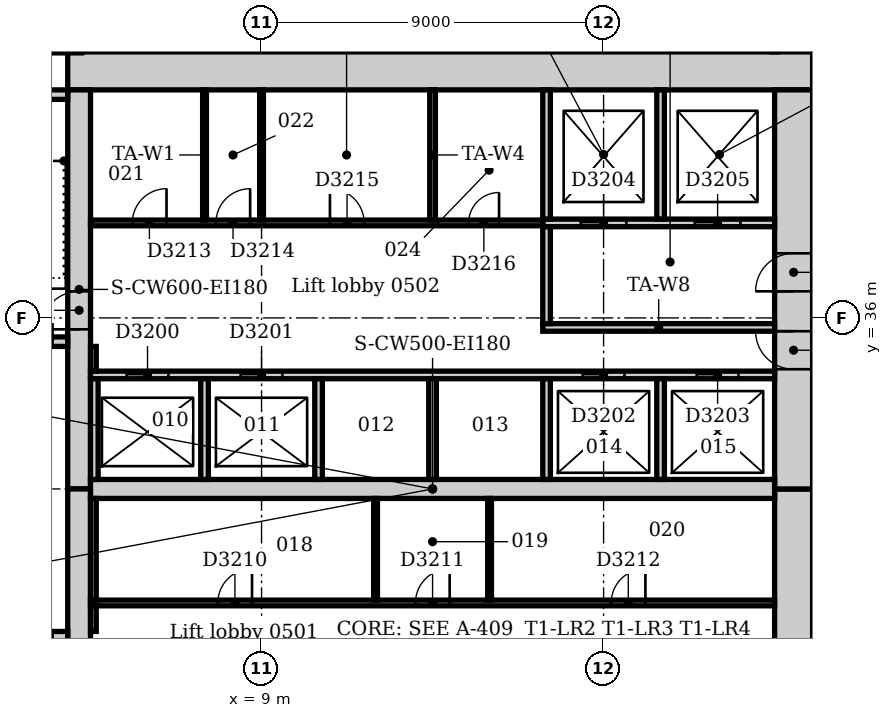
"""IFC4 building model, lengths in metres.
Left out: names, types, materials, properties, quantities, classifications, styles, units other than length and angle.
Written with IfcOpenShell. Run it as: python <this file> out.ifc"""

import sys

from ifc_helpers import new_model, si_unit, direction, frame, frame_2d, origin, origin_2d, place, context, subcontext, project, spatial, rectangle, extrude, element, fill, save


model = new_model("IFC4")
c1 = context("Model", 3, precision=1e-05, world=origin(), true_north=direction((0.0, 1.0)))
c2 = subcontext(c1, "Body", "Model", "MODEL_VIEW")
j1 = project(units=[si_unit("LENGTHUNIT", "METRE"), si_unit("PLANEANGLEUNIT", "RADIAN")], contexts=[c1])
p1 = place(None, origin())
s1 = spatial("IfcSite", under=j1, at=p1, CompositionType="ELEMENT")
p2 = place(p1, origin())
s2 = spatial("IfcBuilding", under=s1, at=p2, CompositionType="ELEMENT")
p3 = place(p2, frame((0.0, 0.0, 26.0)))
s3 = spatial("IfcBuildingStorey", under=s2, at=p3, CompositionType="ELEMENT", Elevation=26.0)
p4 = place(p3, frame((23.5, 42.5, 0.0), z_axis=(0.0, 0.0, 1.0), x_axis=(-1.0, 0.0, 0.0)))
e1 = element("IfcWall", 1, at=p4, inside=s3, PredefinedType="SOLIDWALL", context=c2, shape_type="SweptSolid", body=[
    extrude(rectangle(XDim=19.6, YDim=1.0, at=frame_2d((9.8, 0.0))), origin(), (0.0, 0.0, 1.0), 4.0),
])
p5 = place(p3, frame((23.0, 21.0, 0.0), z_axis=(0.0, 0.0, 1.0), x_axis=(0.0, 1.0, 0.0)))
e2 = element("IfcWall", 2, at=p5, inside=s3, PredefinedType="SOLIDWALL", context=c2, shape_type="SweptSolid", body=[
    extrude(rectangle(XDim=10.5, YDim=1.0, at=frame_2d((5.25, 0.0))), origin(), (0.0, 0.0, 1.0), 4.0),
])
p6 = place(p5, frame((4.35, 0.0, 0.0)))
e3 = element("IfcOpeningElement", 3, at=p6, cuts=e2, PredefinedType="OPENING", context=c2, shape_type="SweptSolid", body=[
    extrude(rectangle(XDim=1.8, YDim=2.1, at=frame_2d((0.9, 1.05))), frame((0.0, 0.51, 0.0), z_axis=(0.0, -1.0, 0.0), x_axis=(1.0, 0.0, 0.0)), (0.0, 0.0, 1.0), 1.02),
])
p7 = place(p3, frame((23.0, 31.5, 0.0), z_axis=(0.0, 0.0, 1.0), x_axis=(0.0, 1.0, 0.0)))
e4 = element("IfcWall", 4, at=p7, inside=s3, PredefinedType="SOLIDWALL", context=c2, shape_type="SweptSolid", body=[
    extrude(rectangle(XDim=10.5, YDim=1.0, at=frame_2d((5.25, 0.0))), origin(), (0.0, 0.0, 1.0), 4.0),
])
p8 = place(p7, frame((3.15, 0.0, 0.0)))
e5 = element("IfcOpeningElement", 5, at=p8, cuts=e4, PredefinedType="OPENING", context=c2, shape_type="SweptSolid", body=[
    extrude(rectangle(XDim=1.0, YDim=2.1, at=frame_2d((0.5, 1.05))), frame((0.0, 0.51, 0.0), z_axis=(0.0, -1.0, 0.0), x_axis=(1.0, 0.0, 0.0)), (0.0, 0.0, 1.0), 1.02),
])
p9 = place(p7, frame((5.2, 0.0, 0.0)))
e6 = element("IfcOpeningElement", 6, at=p9, cuts=e4, PredefinedType="OPENING", context=c2, shape_type="SweptSolid", body=[
    extrude(rectangle(XDim=1.0, YDim=2.1, at=frame_2d((0.5, 1.05))), frame((0.0, 0.51, 0.0), z_axis=(0.0, -1.0, 0.0), x_axis=(1.0, 0.0, 0.0)), (0.0, 0.0, 1.0), 1.02),
])
p10 = place(p3, frame((4.2, 42.0, 0.0), z_axis=(0.0, 0.0, 1.0), x_axis=(0.0, -1.0, 0.0)))
e7 = element("IfcWall", 7, at=p10, inside=s3, PredefinedType="SOLIDWALL", context=c2, shape_type="SweptSolid", body=[
    extrude(rectangle(XDim=10.5, YDim=0.6, at=frame_2d((5.25, 0.0))), origin(), (0.0, 0.0, 1.0), 4.0),
])
p11 = place(p10, frame((5.3, 0.0, 0.0)))
e8 = element("IfcOpeningElement", 8, at=p11, cuts=e7, PredefinedType="OPENING", context=c2, shape_type="SweptSolid", body=[
    extrude(rectangle(XDim=1.0, YDim=2.1, at=frame_2d((0.5, 1.05))), frame((0.0, 0.31, 0.0), z_axis=(0.0, -1.0, 0.0), x_axis=(1.0, 0.0, 0.0)), (0.0, 0.0, 1.0), 0.62),
])
p12 = place(p3, frame((4.2, 31.5, 0.0), z_axis=(0.0, 0.0, 1.0), x_axis=(0.0, -1.0, 0.0)))
e9 = element("IfcWall", 9, at=p12, inside=s3, PredefinedType="SOLIDWALL", context=c2, shape_type="SweptSolid", body=[
    extrude(rectangle(XDim=10.5, YDim=0.6, at=frame_2d((5.25, 0.0))), origin(), (0.0, 0.0, 1.0), 4.0),
])
p13 = place(p12, frame((4.25, 0.0, 0.0)))
e10 = element("IfcOpeningElement", 10, at=p13, cuts=e9, PredefinedType="OPENING", context=c2, shape_type="SweptSolid", body=[
    extrude(rectangle(XDim=1.0, YDim=2.1, at=frame_2d((0.5, 1.05))), frame((0.0, 0.31, 0.0), z_axis=(0.0, -1.0, 0.0), x_axis=(1.0, 0.0, 0.0)), (0.0, 0.0, 1.0), 0.62),
])
p14 = place(p3, frame((4.5, 31.5, 0.0), z_axis=(0.0, 0.0, 1.0), x_axis=(1.0, 0.0, 0.0)))
e11 = element("IfcWall", 11, at=p14, inside=s3, PredefinedType="SOLIDWALL", context=c2, shape_type="SweptSolid", body=[
    extrude(rectangle(XDim=18.0, YDim=0.5, at=frame_2d((9.0, 0.0))), origin(), (0.0, 0.0, 1.0), 4.0),
])
p15 = place(p3, frame((3.9, 27.625, 0.0), z_axis=(0.0, 0.0, 1.0), x_axis=(-1.0, 0.0, 0.0)))
e12 = element("IfcWall", 12, at=p15, inside=s3, PredefinedType="SOLIDWALL", context=c2, shape_type="SweptSolid", body=[
    extrude(rectangle(XDim=3.54, YDim=0.25, at=frame_2d((1.77, 0.0))), origin(), (0.0, 0.0, 1.0), 4.0),
])
p16 = place(p15, frame((0.4, 0.0, 0.0)))
e13 = element("IfcOpeningElement", 13, at=p16, cuts=e12, PredefinedType="OPENING", context=c2, shape_type="SweptSolid", body=[
    extrude(rectangle(XDim=1.0, YDim=2.1, at=frame_2d((0.5, 1.05))), frame((0.0, 0.135, 0.0), z_axis=(0.0, -1.0, 0.0), x_axis=(1.0, 0.0, 0.0)), (0.0, 0.0, 1.0), 0.27),
])
p17 = place(p3, frame((0.36, 35.375, 0.0), z_axis=(0.0, 0.0, 1.0), x_axis=(1.0, 0.0, 0.0)))
e14 = element("IfcWall", 14, at=p17, inside=s3, PredefinedType="SOLIDWALL", context=c2, shape_type="SweptSolid", body=[
    extrude(rectangle(XDim=3.54, YDim=0.25, at=frame_2d((1.77, 0.0))), origin(), (0.0, 0.0, 1.0), 4.0),
])
p18 = place(p17, frame((2.14, 0.0, 0.0)))
e15 = element("IfcOpeningElement", 15, at=p18, cuts=e14, PredefinedType="OPENING", context=c2, shape_type="SweptSolid", body=[
    extrude(rectangle(XDim=1.0, YDim=2.1, at=frame_2d((0.5, 1.05))), frame((0.0, 0.135, 0.0), z_axis=(0.0, -1.0, 0.0), x_axis=(1.0, 0.0, 0.0)), (0.0, 0.0, 1.0), 0.27),
])
p19 = place(p3, frame((3.9, 41.875, 0.0), z_axis=(0.0, 0.0, 1.0), x_axis=(-1.0, 0.0, 0.0)))
e16 = element("IfcWall", 16, at=p19, inside=s3, PredefinedType="SOLIDWALL", context=c2, shape_type="SweptSolid", body=[
    extrude(rectangle(XDim=3.54, YDim=0.25, at=frame_2d((1.77, 0.0))), origin(), (0.0, 0.0, 1.0), 4.0),
])
p20 = place(p3, frame((3.667, 43.574, 0.0), z_axis=(0.0, 0.0, 1.0), x_axis=(1.0, 0.0, 0.0)))
e17 = element("IfcColumn", 17, at=p20, inside=s3, PredefinedType="COLUMN", context=c2, shape_type="SweptSolid", body=[
    extrude(rectangle(XDim=1.2, YDim=1.2, at=origin_2d()), origin(), (0.0, 0.0, 1.0), 3.85),
])
p21 = place(p3, frame((16.4, 35.75, 0.0), z_axis=(0.0, 0.0, 1.0), x_axis=(1.0, 0.0, 0.0)))
e18 = element("IfcWall", 18, at=p21, inside=s3, PredefinedType="PARTITIONING", context=c2, shape_type="SweptSolid", body=[
    extrude(rectangle(XDim=6.1, YDim=0.2, at=frame_2d((3.05, 0.0))), origin(), (0.0, 0.0, 1.0), 3.85),
])
p22 = place(p3, frame((16.4, 38.5, 0.0), z_axis=(0.0, 0.0, 1.0), x_axis=(1.0, 0.0, 0.0)))
e19 = element("IfcWall", 19, at=p22, inside=s3, PredefinedType="PARTITIONING", context=c2, shape_type="SweptSolid", body=[
    extrude(rectangle(XDim=6.1, YDim=0.2, at=frame_2d((3.05, 0.0))), origin(), (0.0, 0.0, 1.0), 3.85),
])
p23 = place(p22, frame((1.0, 0.0, 0.0)))
e20 = element("IfcOpeningElement", 20, at=p23, cuts=e19, PredefinedType="OPENING", context=c2, shape_type="SweptSolid", body=[
    extrude(rectangle(XDim=1.2, YDim=2.1, at=frame_2d((0.6, 1.05))), frame((0.0, 0.11, 0.0), z_axis=(0.0, -1.0, 0.0), x_axis=(1.0, 0.0, 0.0)), (0.0, 0.0, 1.0), 0.22),
])
p24 = place(p22, frame((4.0, 0.0, 0.0)))
e21 = element("IfcOpeningElement", 21, at=p24, cuts=e19, PredefinedType="OPENING", context=c2, shape_type="SweptSolid", body=[
    extrude(rectangle(XDim=1.2, YDim=2.1, at=frame_2d((0.6, 1.05))), frame((0.0, 0.11, 0.0), z_axis=(0.0, -1.0, 0.0), x_axis=(1.0, 0.0, 0.0)), (0.0, 0.0, 1.0), 0.22),
])
p25 = place(p3, frame((16.5, 35.85, 0.0), z_axis=(0.0, 0.0, 1.0), x_axis=(0.0, 1.0, 0.0)))
e22 = element("IfcWall", 22, at=p25, inside=s3, PredefinedType="PARTITIONING", context=c2, shape_type="SweptSolid", body=[
    extrude(rectangle(XDim=2.55, YDim=0.2, at=frame_2d((1.275, 0.0))), origin(), (0.0, 0.0, 1.0), 3.85),
])
p26 = place(p3, frame((4.5, 34.5, 0.0), z_axis=(0.0, 0.0, 1.0), x_axis=(1.0, 0.0, 0.0)))
e23 = element("IfcWall", 23, at=p26, inside=s3, PredefinedType="PARTITIONING", context=c2, shape_type="SweptSolid", body=[
    extrude(rectangle(XDim=18.0, YDim=0.2, at=frame_2d((9.0, 0.0))), origin(), (0.0, 0.0, 1.0), 3.85),
])
p27 = place(p26, frame((0.95, 0.0, 0.0)))
e24 = element("IfcOpeningElement", 24, at=p27, cuts=e23, PredefinedType="OPENING", context=c2, shape_type="SweptSolid", body=[
    extrude(rectangle(XDim=1.1, YDim=2.1, at=frame_2d((0.55, 1.05))), frame((0.0, 0.11, 0.0), z_axis=(0.0, -1.0, 0.0), x_axis=(1.0, 0.0, 0.0)), (0.0, 0.0, 1.0), 0.22),
])
p28 = place(p26, frame((3.95, 0.0, 0.0)))
e25 = element("IfcOpeningElement", 25, at=p28, cuts=e23, PredefinedType="OPENING", context=c2, shape_type="SweptSolid", body=[
    extrude(rectangle(XDim=1.1, YDim=2.1, at=frame_2d((0.55, 1.05))), frame((0.0, 0.11, 0.0), z_axis=(0.0, -1.0, 0.0), x_axis=(1.0, 0.0, 0.0)), (0.0, 0.0, 1.0), 0.22),
])
p29 = place(p26, frame((12.95, 0.0, 0.0)))
e26 = element("IfcOpeningElement", 26, at=p29, cuts=e23, PredefinedType="OPENING", context=c2, shape_type="SweptSolid", body=[
    extrude(rectangle(XDim=1.1, YDim=2.1, at=frame_2d((0.55, 1.05))), frame((0.0, 0.11, 0.0), z_axis=(0.0, -1.0, 0.0), x_axis=(1.0, 0.0, 0.0)), (0.0, 0.0, 1.0), 0.22),
])
p30 = place(p26, frame((15.95, 0.0, 0.0)))
e27 = element("IfcOpeningElement", 27, at=p30, cuts=e23, PredefinedType="OPENING", context=c2, shape_type="SweptSolid", body=[
    extrude(rectangle(XDim=1.1, YDim=2.1, at=frame_2d((0.55, 1.05))), frame((0.0, 0.11, 0.0), z_axis=(0.0, -1.0, 0.0), x_axis=(1.0, 0.0, 0.0)), (0.0, 0.0, 1.0), 0.22),
])
for number, where, z_axis, x_axis in (
    (28, (16.5, 38.6, 0.0), (0.0, 0.0, 1.0), (0.0, 1.0, 0.0)),
    (29, (19.5, 38.6, 0.0), (0.0, 0.0, 1.0), (0.0, 1.0, 0.0)),
):
    element("IfcWall", number, at=place(p3, frame(where, z_axis=z_axis, x_axis=x_axis)), inside=s3, PredefinedType="PARTITIONING", context=c2, shape_type="SweptSolid", body=[
        extrude(rectangle(XDim=3.4, YDim=0.2, at=frame_2d((1.7, 0.0))), origin(), (0.0, 0.0, 1.0), 3.85),
    ])
for number, where, z_axis, x_axis in (
    (30, (4.6, 31.75, 0.0), (0.0, 0.0, 1.0), (0.0, 1.0, 0.0)),
    (31, (7.5, 31.75, 0.0), (0.0, 0.0, 1.0), (0.0, 1.0, 0.0)),
    (32, (10.5, 31.75, 0.0), (0.0, 0.0, 1.0), (0.0, 1.0, 0.0)),
    (33, (13.5, 31.75, 0.0), (0.0, 0.0, 1.0), (0.0, 1.0, 0.0)),
    (34, (16.5, 31.75, 0.0), (0.0, 0.0, 1.0), (0.0, 1.0, 0.0)),
    (35, (19.5, 31.75, 0.0), (0.0, 0.0, 1.0), (0.0, 1.0, 0.0)),
):
    element("IfcWall", number, at=place(p3, frame(where, z_axis=z_axis, x_axis=x_axis)), inside=s3, PredefinedType="PARTITIONING", context=c2, shape_type="SweptSolid", body=[
        extrude(rectangle(XDim=2.65, YDim=0.2, at=frame_2d((1.325, 0.0))), origin(), (0.0, 0.0, 1.0), 3.85),
    ])
p31 = place(p3, frame((4.5, 28.5, 0.0), z_axis=(0.0, 0.0, 1.0), x_axis=(1.0, 0.0, 0.0)))
e36 = element("IfcWall", 36, at=p31, inside=s3, PredefinedType="PARTITIONING", context=c2, shape_type="SweptSolid", body=[
    extrude(rectangle(XDim=18.0, YDim=0.15, at=frame_2d((9.0, 0.0))), origin(), (0.0, 0.0, 1.0), 3.85),
])
p32 = place(p31, frame((3.35, 0.0, 0.0)))
e37 = element("IfcOpeningElement", 37, at=p32, cuts=e36, PredefinedType="OPENING", context=c2, shape_type="SweptSolid", body=[
    extrude(rectangle(XDim=0.9, YDim=2.1, at=frame_2d((0.45, 1.05))), frame((0.0, 0.085, 0.0), z_axis=(0.0, -1.0, 0.0), x_axis=(1.0, 0.0, 0.0)), (0.0, 0.0, 1.0), 0.17),
])
p33 = place(p31, frame((8.55, 0.0, 0.0)))
e38 = element("IfcOpeningElement", 38, at=p33, cuts=e36, PredefinedType="OPENING", context=c2, shape_type="SweptSolid", body=[
    extrude(rectangle(XDim=0.9, YDim=2.1, at=frame_2d((0.45, 1.05))), frame((0.0, 0.085, 0.0), z_axis=(0.0, -1.0, 0.0), x_axis=(1.0, 0.0, 0.0)), (0.0, 0.0, 1.0), 0.17),
])
p34 = place(p31, frame((13.7, 0.0, 0.0)))
e39 = element("IfcOpeningElement", 39, at=p34, cuts=e36, PredefinedType="OPENING", context=c2, shape_type="SweptSolid", body=[
    extrude(rectangle(XDim=0.9, YDim=2.1, at=frame_2d((0.45, 1.05))), frame((0.0, 0.085, 0.0), z_axis=(0.0, -1.0, 0.0), x_axis=(1.0, 0.0, 0.0)), (0.0, 0.0, 1.0), 0.17),
])
p35 = place(p3, frame((4.5, 38.5, 0.0), z_axis=(0.0, 0.0, 1.0), x_axis=(1.0, 0.0, 0.0)))
e40 = element("IfcWall", 40, at=p35, inside=s3, PredefinedType="PARTITIONING", context=c2, shape_type="SweptSolid", body=[
    extrude(rectangle(XDim=11.9, YDim=0.15, at=frame_2d((5.95, 0.0))), origin(), (0.0, 0.0, 1.0), 3.85),
])
p36 = place(p35, frame((1.1, 0.0, 0.0)))
e41 = element("IfcOpeningElement", 41, at=p36, cuts=e40, PredefinedType="OPENING", context=c2, shape_type="SweptSolid", body=[
    extrude(rectangle(XDim=0.9, YDim=2.1, at=frame_2d((0.45, 1.05))), frame((0.0, 0.085, 0.0), z_axis=(0.0, -1.0, 0.0), x_axis=(1.0, 0.0, 0.0)), (0.0, 0.0, 1.0), 0.17),
])
p37 = place(p35, frame((3.3, 0.0, 0.0)))
e42 = element("IfcOpeningElement", 42, at=p37, cuts=e40, PredefinedType="OPENING", context=c2, shape_type="SweptSolid", body=[
    extrude(rectangle(XDim=0.9, YDim=2.1, at=frame_2d((0.45, 1.05))), frame((0.0, 0.085, 0.0), z_axis=(0.0, -1.0, 0.0), x_axis=(1.0, 0.0, 0.0)), (0.0, 0.0, 1.0), 0.17),
])
p38 = place(p35, frame((6.3, 0.0, 0.0)))
e43 = element("IfcOpeningElement", 43, at=p38, cuts=e40, PredefinedType="OPENING", context=c2, shape_type="SweptSolid", body=[
    extrude(rectangle(XDim=0.9, YDim=2.1, at=frame_2d((0.45, 1.05))), frame((0.0, 0.085, 0.0), z_axis=(0.0, -1.0, 0.0), x_axis=(1.0, 0.0, 0.0)), (0.0, 0.0, 1.0), 0.17),
])
p39 = place(p35, frame((9.95, 0.0, 0.0)))
e44 = element("IfcOpeningElement", 44, at=p39, cuts=e40, PredefinedType="OPENING", context=c2, shape_type="SweptSolid", body=[
    extrude(rectangle(XDim=0.8, YDim=2.1, at=frame_2d((0.4, 1.05))), frame((0.0, 0.085, 0.0), z_axis=(0.0, -1.0, 0.0), x_axis=(1.0, 0.0, 0.0)), (0.0, 0.0, 1.0), 0.17),
])
p40 = place(p3, frame((4.575, 27.75, 0.0), z_axis=(0.0, 0.0, 1.0), x_axis=(0.0, 1.0, 0.0)))
e45 = element("IfcWall", 45, at=p40, inside=s3, PredefinedType="PARTITIONING", context=c2, shape_type="SweptSolid", body=[
    extrude(rectangle(XDim=0.675, YDim=0.15, at=frame_2d((0.338, 0.0))), origin(), (0.0, 0.0, 1.0), 3.85),
])
p41 = place(p3, frame((4.575, 28.575, 0.0), z_axis=(0.0, 0.0, 1.0), x_axis=(0.0, 1.0, 0.0)))
e46 = element("IfcWall", 46, at=p41, inside=s3, PredefinedType="PARTITIONING", context=c2, shape_type="SweptSolid", body=[
    extrude(rectangle(XDim=2.675, YDim=0.15, at=frame_2d((1.337, 0.0))), origin(), (0.0, 0.0, 1.0), 3.85),
])
p42 = place(p3, frame((4.575, 34.6, 0.0), z_axis=(0.0, 0.0, 1.0), x_axis=(0.0, 1.0, 0.0)))
e47 = element("IfcWall", 47, at=p42, inside=s3, PredefinedType="PARTITIONING", context=c2, shape_type="SweptSolid", body=[
    extrude(rectangle(XDim=0.65, YDim=0.15, at=frame_2d((0.325, 0.0))), origin(), (0.0, 0.0, 1.0), 3.85),
])
p43 = place(p3, frame((13.5, 38.575, 0.0), z_axis=(0.0, 0.0, 1.0), x_axis=(0.0, 1.0, 0.0)))
e48 = element("IfcWall", 48, at=p43, inside=s3, PredefinedType="PARTITIONING", context=c2, shape_type="SweptSolid", body=[
    extrude(rectangle(XDim=3.425, YDim=0.15, at=frame_2d((1.712, 0.0))), origin(), (0.0, 0.0, 1.0), 3.85),
])
for number, where, z_axis, x_axis in (
    (49, (7.5, 38.575, 0.0), (0.0, 0.0, 1.0), (0.0, 1.0, 0.0)),
    (50, (9.0, 38.575, 0.0), (0.0, 0.0, 1.0), (0.0, 1.0, 0.0)),
):
    element("IfcWall", number, at=place(p3, frame(where, z_axis=z_axis, x_axis=x_axis)), inside=s3, PredefinedType="PARTITIONING", context=c2, shape_type="SweptSolid", body=[
        extrude(rectangle(XDim=3.425, YDim=0.1, at=frame_2d((1.712, 0.0))), origin(), (0.0, 0.0, 1.0), 3.85),
    ])
for number, where, z_axis, x_axis in (
    (51, (12.0, 28.575, 0.0), (0.0, 0.0, 1.0), (0.0, 1.0, 0.0)),
    (52, (15.0, 28.575, 0.0), (0.0, 0.0, 1.0), (0.0, 1.0, 0.0)),
):
    element("IfcWall", number, at=place(p3, frame(where, z_axis=z_axis, x_axis=x_axis)), inside=s3, PredefinedType="PARTITIONING", context=c2, shape_type="SweptSolid", body=[
        extrude(rectangle(XDim=2.675, YDim=0.1, at=frame_2d((1.337, 0.0))), origin(), (0.0, 0.0, 1.0), 3.85),
    ])
p44 = place(p11, frame((1.0, 0.0, 0.0), z_axis=(0.0, 0.0, 1.0), x_axis=(-1.0, 0.0, 0.0)))
e53 = element("IfcDoor", 53, at=p44, inside=s3, OperationType="SINGLE_SWING_LEFT", PredefinedType="DOOR", context=c2, shape_type="SweptSolid", body=[
    extrude(rectangle(XDim=1.0, YDim=2.1, at=frame_2d((0.5, 1.05))), frame((0.0, 0.025, 0.0), z_axis=(0.0, -1.0, 0.0), x_axis=(1.0, 0.0, 0.0)), (0.0, 0.0, 1.0), 0.05),
])
fill(e8, e53)
p45 = place(p27, origin())
e54 = element("IfcDoor", 54, at=p45, inside=s3, OperationType="SLIDING_TO_LEFT", PredefinedType="DOOR", context=c2, shape_type="SweptSolid", body=[
    extrude(rectangle(XDim=1.1, YDim=2.1, at=frame_2d((0.55, 1.05))), frame((0.0, 0.025, 0.0), z_axis=(0.0, -1.0, 0.0), x_axis=(1.0, 0.0, 0.0)), (0.0, 0.0, 1.0), 0.05),
])
fill(e24, e54)
p46 = place(p28, origin())
e55 = element("IfcDoor", 55, at=p46, inside=s3, OperationType="SLIDING_TO_LEFT", PredefinedType="DOOR", context=c2, shape_type="SweptSolid", body=[
    extrude(rectangle(XDim=1.1, YDim=2.1, at=frame_2d((0.55, 1.05))), frame((0.0, 0.025, 0.0), z_axis=(0.0, -1.0, 0.0), x_axis=(1.0, 0.0, 0.0)), (0.0, 0.0, 1.0), 0.05),
])
fill(e25, e55)
p47 = place(p29, origin())
e56 = element("IfcDoor", 56, at=p47, inside=s3, OperationType="SLIDING_TO_LEFT", PredefinedType="DOOR", context=c2, shape_type="SweptSolid", body=[
    extrude(rectangle(XDim=1.1, YDim=2.1, at=frame_2d((0.55, 1.05))), frame((0.0, 0.025, 0.0), z_axis=(0.0, -1.0, 0.0), x_axis=(1.0, 0.0, 0.0)), (0.0, 0.0, 1.0), 0.05),
])
fill(e26, e56)
p48 = place(p30, origin())
e57 = element("IfcDoor", 57, at=p48, inside=s3, OperationType="SLIDING_TO_LEFT", PredefinedType="DOOR", context=c2, shape_type="SweptSolid", body=[
    extrude(rectangle(XDim=1.1, YDim=2.1, at=frame_2d((0.55, 1.05))), frame((0.0, 0.025, 0.0), z_axis=(0.0, -1.0, 0.0), x_axis=(1.0, 0.0, 0.0)), (0.0, 0.0, 1.0), 0.05),
])
fill(e27, e57)
p49 = place(p23, origin())
e58 = element("IfcDoor", 58, at=p49, inside=s3, OperationType="SLIDING_TO_LEFT", PredefinedType="DOOR", context=c2, shape_type="SweptSolid", body=[
    extrude(rectangle(XDim=1.2, YDim=2.1, at=frame_2d((0.6, 1.05))), frame((0.0, 0.025, 0.0), z_axis=(0.0, -1.0, 0.0), x_axis=(1.0, 0.0, 0.0)), (0.0, 0.0, 1.0), 0.05),
])
fill(e20, e58)
p50 = place(p24, origin())
e59 = element("IfcDoor", 59, at=p50, inside=s3, OperationType="SLIDING_TO_LEFT", PredefinedType="DOOR", context=c2, shape_type="SweptSolid", body=[
    extrude(rectangle(XDim=1.2, YDim=2.1, at=frame_2d((0.6, 1.05))), frame((0.0, 0.025, 0.0), z_axis=(0.0, -1.0, 0.0), x_axis=(1.0, 0.0, 0.0)), (0.0, 0.0, 1.0), 0.05),
])
fill(e21, e59)
p51 = place(p8, origin())
e60 = element("IfcDoor", 60, at=p51, inside=s3, OperationType="SINGLE_SWING_RIGHT", PredefinedType="DOOR", context=c2, shape_type="SweptSolid", body=[
    extrude(rectangle(XDim=1.0, YDim=2.1, at=frame_2d((0.5, 1.05))), frame((0.0, 0.025, 0.0), z_axis=(0.0, -1.0, 0.0), x_axis=(1.0, 0.0, 0.0)), (0.0, 0.0, 1.0), 0.05),
])
fill(e5, e60)
p52 = place(p9, origin())
e61 = element("IfcDoor", 61, at=p52, inside=s3, OperationType="SINGLE_SWING_LEFT", PredefinedType="DOOR", context=c2, shape_type="SweptSolid", body=[
    extrude(rectangle(XDim=1.0, YDim=2.1, at=frame_2d((0.5, 1.05))), frame((0.0, 0.025, 0.0), z_axis=(0.0, -1.0, 0.0), x_axis=(1.0, 0.0, 0.0)), (0.0, 0.0, 1.0), 0.05),
])
fill(e6, e61)
p53 = place(p32, origin())
e62 = element("IfcDoor", 62, at=p53, inside=s3, OperationType="SINGLE_SWING_RIGHT", PredefinedType="DOOR", context=c2, shape_type="SweptSolid", body=[
    extrude(rectangle(XDim=0.9, YDim=2.1, at=frame_2d((0.45, 1.05))), frame((0.0, 0.025, 0.0), z_axis=(0.0, -1.0, 0.0), x_axis=(1.0, 0.0, 0.0)), (0.0, 0.0, 1.0), 0.05),
])
fill(e37, e62)
p54 = place(p33, origin())
e63 = element("IfcDoor", 63, at=p54, inside=s3, OperationType="SINGLE_SWING_RIGHT", PredefinedType="DOOR", context=c2, shape_type="SweptSolid", body=[
    extrude(rectangle(XDim=0.9, YDim=2.1, at=frame_2d((0.45, 1.05))), frame((0.0, 0.025, 0.0), z_axis=(0.0, -1.0, 0.0), x_axis=(1.0, 0.0, 0.0)), (0.0, 0.0, 1.0), 0.05),
])
fill(e38, e63)
p55 = place(p34, origin())
e64 = element("IfcDoor", 64, at=p55, inside=s3, OperationType="SINGLE_SWING_RIGHT", PredefinedType="DOOR", context=c2, shape_type="SweptSolid", body=[
    extrude(rectangle(XDim=0.9, YDim=2.1, at=frame_2d((0.45, 1.05))), frame((0.0, 0.025, 0.0), z_axis=(0.0, -1.0, 0.0), x_axis=(1.0, 0.0, 0.0)), (0.0, 0.0, 1.0), 0.05),
])
fill(e39, e64)
p56 = place(p36, origin())
e65 = element("IfcDoor", 65, at=p56, inside=s3, OperationType="SINGLE_SWING_RIGHT", PredefinedType="DOOR", context=c2, shape_type="SweptSolid", body=[
    extrude(rectangle(XDim=0.9, YDim=2.1, at=frame_2d((0.45, 1.05))), frame((0.0, 0.025, 0.0), z_axis=(0.0, -1.0, 0.0), x_axis=(1.0, 0.0, 0.0)), (0.0, 0.0, 1.0), 0.05),
])
fill(e41, e65)
p57 = place(p37, origin())
e66 = element("IfcDoor", 66, at=p57, inside=s3, OperationType="SINGLE_SWING_RIGHT", PredefinedType="DOOR", context=c2, shape_type="SweptSolid", body=[
    extrude(rectangle(XDim=0.9, YDim=2.1, at=frame_2d((0.45, 1.05))), frame((0.0, 0.025, 0.0), z_axis=(0.0, -1.0, 0.0), x_axis=(1.0, 0.0, 0.0)), (0.0, 0.0, 1.0), 0.05),
])
fill(e42, e66)
p58 = place(p38, origin())
e67 = element("IfcDoor", 67, at=p58, inside=s3, OperationType="SINGLE_SWING_LEFT", PredefinedType="DOOR", context=c2, shape_type="SweptSolid", body=[
    extrude(rectangle(XDim=0.9, YDim=2.1, at=frame_2d((0.45, 1.05))), frame((0.0, 0.025, 0.0), z_axis=(0.0, -1.0, 0.0), x_axis=(1.0, 0.0, 0.0)), (0.0, 0.0, 1.0), 0.05),
])
fill(e43, e67)
p59 = place(p39, origin())
e68 = element("IfcDoor", 68, at=p59, inside=s3, OperationType="SINGLE_SWING_RIGHT", PredefinedType="DOOR", context=c2, shape_type="SweptSolid", body=[
    extrude(rectangle(XDim=0.8, YDim=2.1, at=frame_2d((0.4, 1.05))), frame((0.0, 0.025, 0.0), z_axis=(0.0, -1.0, 0.0), x_axis=(1.0, 0.0, 0.0)), (0.0, 0.0, 1.0), 0.05),
])
fill(e44, e68)
save(model, sys.argv[1])
